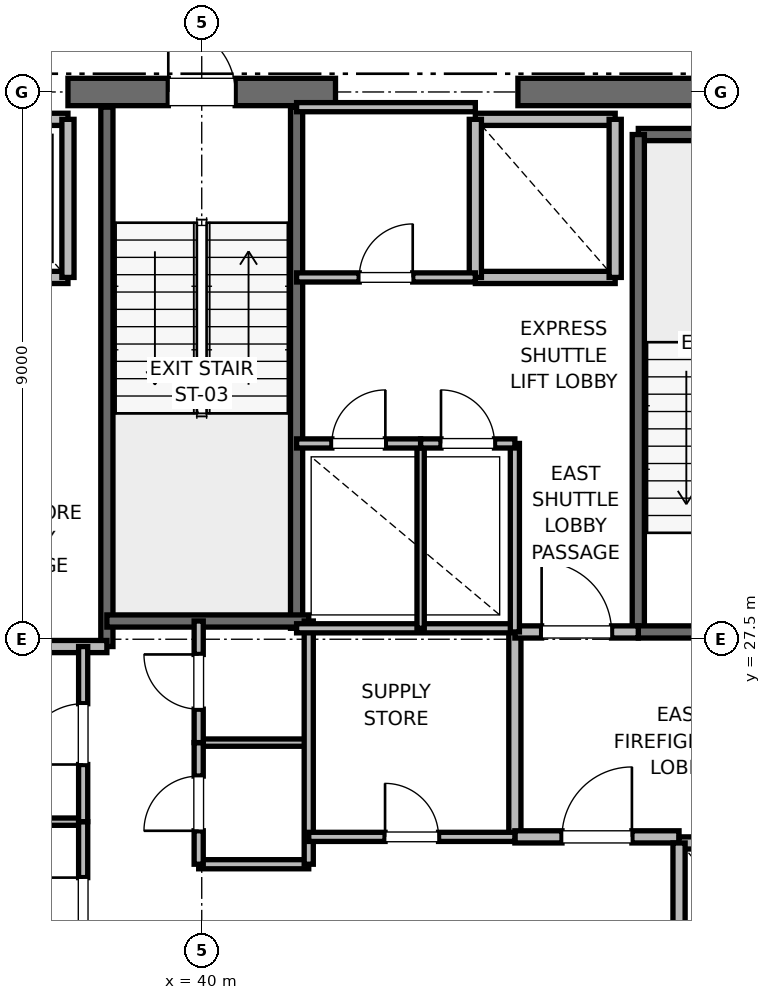
"""IFC4 building model, lengths in metres.
Left out: names, types, materials, properties, quantities, classifications, styles, units other than length and angle.
Written with IfcOpenShell. Run it as: python <this file> out.ifc"""

import sys

from ifc_helpers import new_model, si_unit, direction, frame, frame_2d, origin, place, context, subcontext, project, spatial, rectangle, extrude, element, fill, save


model = new_model("IFC4")
c1 = context("Model", 3, precision=1e-05, world=origin(), true_north=direction((0.0, 1.0)))
c2 = subcontext(c1, "Body", "Model", "MODEL_VIEW")
j1 = project(units=[si_unit("LENGTHUNIT", "METRE"), si_unit("PLANEANGLEUNIT", "RADIAN")], contexts=[c1])
p1 = place(None, origin())
s1 = spatial("IfcSite", under=j1, at=p1, CompositionType="ELEMENT")
p2 = place(p1, origin())
s2 = spatial("IfcBuilding", under=s1, at=p2, CompositionType="ELEMENT")
p3 = place(p2, frame((0.0, 0.0, 259.2)))
s3 = spatial("IfcBuildingStorey", under=s2, at=p3, CompositionType="ELEMENT", Elevation=259.2)
p4 = place(p3, frame((37.8, 36.5, 0.0), z_axis=(0.0, 0.0, 1.0), x_axis=(1.0, 0.0, 0.0)))
e1 = element("IfcWall", 1, at=p4, inside=s3, PredefinedType="SHEAR", context=c2, shape_type="SweptSolid", body=[
    extrude(rectangle(XDim=4.4, YDim=0.45, at=frame_2d((2.2, 0.0))), origin(), (0.0, 0.0, 1.0), 3.785),
])
p5 = place(p4, frame((1.65, 0.0, 0.0)))
e2 = element("IfcOpeningElement", 2, at=p5, cuts=e1, PredefinedType="OPENING", context=c2, shape_type="SweptSolid", body=[
    extrude(rectangle(XDim=1.1, YDim=2.15, at=frame_2d((0.55, 1.075))), frame((0.0, 0.225, 0.0), z_axis=(0.0, -1.0, 0.0), x_axis=(1.0, 0.0, 0.0)), (0.0, 0.0, 1.0), 0.45),
])
p6 = place(p3, frame((45.2, 36.5, 0.0), z_axis=(0.0, 0.0, 1.0), x_axis=(1.0, 0.0, 0.0)))
e3 = element("IfcWall", 3, at=p6, inside=s3, PredefinedType="SHEAR", context=c2, shape_type="SweptSolid", body=[
    extrude(rectangle(XDim=5.8, YDim=0.45, at=frame_2d((2.9, 0.0))), origin(), (0.0, 0.0, 1.0), 3.785),
])
p7 = place(p3, frame((47.18, 35.8, 0.0), z_axis=(0.0, 0.0, 1.0), x_axis=(1.0, 0.0, 0.0)))
e4 = element("IfcWall", 4, at=p7, inside=s3, PredefinedType="SOLIDWALL", context=c2, shape_type="SweptSolid", body=[
    extrude(rectangle(XDim=3.12, YDim=0.2, at=frame_2d((1.56, 0.0))), origin(), (0.0, 0.0, 1.0), 3.785),
])
p8 = place(p3, frame((47.18, 27.62, 0.0), z_axis=(0.0, 0.0, 1.0), x_axis=(0.0, 1.0, 0.0)))
e5 = element("IfcWall", 5, at=p8, inside=s3, PredefinedType="SOLIDWALL", context=c2, shape_type="SweptSolid", body=[
    extrude(rectangle(XDim=8.18, YDim=0.2, at=frame_2d((4.09, 0.0))), origin(), (0.0, 0.0, 1.0), 3.785),
])
p9 = place(p3, frame((47.18, 27.62, 0.0), z_axis=(0.0, 0.0, 1.0), x_axis=(1.0, 0.0, 0.0)))
e6 = element("IfcWall", 6, at=p9, inside=s3, PredefinedType="SOLIDWALL", context=c2, shape_type="SweptSolid", body=[
    extrude(rectangle(XDim=3.12, YDim=0.2, at=frame_2d((1.56, 0.0))), origin(), (0.0, 0.0, 1.0), 3.785),
])
p10 = place(p9, frame((1.01, 0.0, 0.0)))
e7 = element("IfcOpeningElement", 7, at=p10, cuts=e6, PredefinedType="OPENING", context=c2, shape_type="SweptSolid", body=[
    extrude(rectangle(XDim=1.1, YDim=2.15, at=frame_2d((0.55, 1.075))), frame((0.0, 0.1, 0.0), z_axis=(0.0, -1.0, 0.0), x_axis=(1.0, 0.0, 0.0)), (0.0, 0.0, 1.0), 0.2),
])
p11 = place(p3, frame((38.44, 27.38, 0.0), z_axis=(0.0, 0.0, 1.0), x_axis=(0.0, 1.0, 0.0)))
e8 = element("IfcWall", 8, at=p11, inside=s3, PredefinedType="SOLIDWALL", context=c2, shape_type="SweptSolid", body=[
    extrude(rectangle(XDim=8.87, YDim=0.2, at=frame_2d((4.435, 0.0))), origin(), (0.0, 0.0, 1.0), 3.785),
])
p12 = place(p3, frame((41.56, 27.68, 0.0), z_axis=(0.0, 0.0, 1.0), x_axis=(0.0, 1.0, 0.0)))
e9 = element("IfcWall", 9, at=p12, inside=s3, PredefinedType="SOLIDWALL", context=c2, shape_type="SweptSolid", body=[
    extrude(rectangle(XDim=8.57, YDim=0.2, at=frame_2d((4.285, 0.0))), origin(), (0.0, 0.0, 1.0), 3.785),
])
p13 = place(p3, frame((38.44, 27.8, 0.0), z_axis=(0.0, 0.0, 1.0), x_axis=(1.0, 0.0, 0.0)))
e10 = element("IfcWall", 10, at=p13, inside=s3, PredefinedType="SOLIDWALL", context=c2, shape_type="SweptSolid", body=[
    extrude(rectangle(XDim=3.32, YDim=0.2, at=frame_2d((1.66, 0.0))), origin(), (0.0, 0.0, 1.0), 3.785),
])
p14 = place(p3, frame((32.82, 27.38, 0.0), z_axis=(0.0, 0.0, 1.0), x_axis=(1.0, 0.0, 0.0)))
e11 = element("IfcWall", 11, at=p14, inside=s3, PredefinedType="PARTITIONING", context=c2, shape_type="SweptSolid", body=[
    extrude(rectangle(XDim=5.62, YDim=0.2, at=frame_2d((2.81, 0.0))), origin(), (0.0, 0.0, 1.0), 3.785),
])
p15 = place(p3, frame((45.15, 24.25, 0.0), z_axis=(0.0, 0.0, 1.0), x_axis=(0.0, 1.0, 0.0)))
e12 = element("IfcWall", 12, at=p15, inside=s3, PredefinedType="PARTITIONING", context=c2, shape_type="SweptSolid", body=[
    extrude(rectangle(XDim=3.37, YDim=0.2, at=frame_2d((1.685, 0.0))), origin(), (0.0, 0.0, 1.0), 3.785),
])
p16 = place(p3, frame((45.15, 24.25, 0.0), z_axis=(0.0, 0.0, 1.0), x_axis=(1.0, 0.0, 0.0)))
e13 = element("IfcWall", 13, at=p16, inside=s3, PredefinedType="PARTITIONING", context=c2, shape_type="SweptSolid", body=[
    extrude(rectangle(XDim=2.7, YDim=0.2, at=frame_2d((1.35, 0.0))), origin(), (0.0, 0.0, 1.0), 3.785),
])
p17 = place(p16, frame((0.775, 0.0, 0.0)))
e14 = element("IfcOpeningElement", 14, at=p17, cuts=e13, PredefinedType="OPENING", context=c2, shape_type="SweptSolid", body=[
    extrude(rectangle(XDim=1.15, YDim=2.2, at=frame_2d((0.575, 1.1))), frame((0.0, 0.1, 0.0), z_axis=(0.0, -1.0, 0.0), x_axis=(1.0, 0.0, 0.0)), (0.0, 0.0, 1.0), 0.2),
])
p18 = place(p3, frame((45.15, 27.62, 0.0), z_axis=(0.0, 0.0, 1.0), x_axis=(1.0, 0.0, 0.0)))
e15 = element("IfcWall", 15, at=p18, inside=s3, PredefinedType="PARTITIONING", context=c2, shape_type="SweptSolid", body=[
    extrude(rectangle(XDim=2.03, YDim=0.2, at=frame_2d((1.015, 0.0))), origin(), (0.0, 0.0, 1.0), 3.785),
])
p19 = place(p18, frame((0.44, 0.0, 0.0)))
e16 = element("IfcOpeningElement", 16, at=p19, cuts=e15, PredefinedType="OPENING", context=c2, shape_type="SweptSolid", body=[
    extrude(rectangle(XDim=1.15, YDim=2.2, at=frame_2d((0.575, 1.1))), frame((0.0, 0.1, 0.0), z_axis=(0.0, -1.0, 0.0), x_axis=(1.0, 0.0, 0.0)), (0.0, 0.0, 1.0), 0.2),
])
p20 = place(p3, frame((50.45, 24.15, 0.0), z_axis=(0.0, 0.0, 1.0), x_axis=(-1.0, 0.0, 0.0)))
e17 = element("IfcWall", 17, at=p20, inside=s3, PredefinedType="SOLIDWALL", context=c2, shape_type="SweptSolid", body=[
    extrude(rectangle(XDim=2.6, YDim=0.2, at=frame_2d((1.3, 0.0))), origin(), (0.0, 0.0, 1.0), 2.865),
])
p21 = place(p20, frame((0.75, 0.0, 0.0)))
e18 = element("IfcOpeningElement", 18, at=p21, cuts=e17, PredefinedType="OPENING", context=c2, shape_type="SweptSolid", body=[
    extrude(rectangle(XDim=1.1, YDim=2.2, at=frame_2d((0.55, 1.1))), frame((0.0, 0.1, 0.0), z_axis=(0.0, -1.0, 0.0), x_axis=(1.0, 0.0, 0.0)), (0.0, 0.0, 1.0), 0.2),
])
p22 = place(p3, frame((47.85, 24.15, 0.0), z_axis=(0.0, 0.0, 1.0), x_axis=(0.0, -1.0, 0.0)))
e19 = element("IfcWall", 19, at=p22, inside=s3, PredefinedType="SOLIDWALL", context=c2, shape_type="SweptSolid", body=[
    extrude(rectangle(XDim=3.0, YDim=0.2, at=frame_2d((1.5, 0.0))), origin(), (0.0, 0.0, 1.0), 3.785),
])
p23 = place(p3, frame((35.5, 33.45, 0.0), z_axis=(0.0, 0.0, 1.0), x_axis=(1.0, 0.0, 0.0)))
e20 = element("IfcWall", 20, at=p23, inside=s3, PredefinedType="SOLIDWALL", context=c2, shape_type="SweptSolid", body=[
    extrude(rectangle(XDim=2.3, YDim=0.2, at=frame_2d((1.15, 0.0))), origin(), (0.0, 0.0, 1.0), 3.785),
])
p24 = place(p23, frame((0.6, 0.0, 0.0)))
e21 = element("IfcOpeningElement", 21, at=p24, cuts=e20, PredefinedType="OPENING", context=c2, shape_type="SweptSolid", body=[
    extrude(rectangle(XDim=1.1, YDim=2.2, at=frame_2d((0.55, 1.1))), frame((0.0, 0.1, 0.0), z_axis=(0.0, -1.0, 0.0), x_axis=(1.0, 0.0, 0.0)), (0.0, 0.0, 1.0), 0.2),
])
p25 = place(p3, frame((37.8, 36.05, 0.0), z_axis=(0.0, 0.0, 1.0), x_axis=(-1.0, 0.0, 0.0)))
e22 = element("IfcWall", 22, at=p25, inside=s3, PredefinedType="SOLIDWALL", context=c2, shape_type="SweptSolid", body=[
    extrude(rectangle(XDim=2.3, YDim=0.2, at=frame_2d((1.15, 0.0))), origin(), (0.0, 0.0, 1.0), 2.865),
])
p26 = place(p3, frame((37.8, 33.45, 0.0), z_axis=(0.0, 0.0, 1.0), x_axis=(0.0, 1.0, 0.0)))
e23 = element("IfcWall", 23, at=p26, inside=s3, PredefinedType="SOLIDWALL", context=c2, shape_type="SweptSolid", body=[
    extrude(rectangle(XDim=2.6, YDim=0.2, at=frame_2d((1.3, 0.0))), origin(), (0.0, 0.0, 1.0), 2.865),
])
p27 = place(p3, frame((44.5, 33.45, 0.0), z_axis=(0.0, 0.0, 1.0), x_axis=(1.0, 0.0, 0.0)))
e24 = element("IfcWall", 24, at=p27, inside=s3, PredefinedType="SOLIDWALL", context=c2, shape_type="SweptSolid", body=[
    extrude(rectangle(XDim=2.3, YDim=0.2, at=frame_2d((1.15, 0.0))), origin(), (0.0, 0.0, 1.0), 3.785),
])
p28 = place(p3, frame((46.8, 36.05, 0.0), z_axis=(0.0, 0.0, 1.0), x_axis=(-1.0, 0.0, 0.0)))
e25 = element("IfcWall", 25, at=p28, inside=s3, PredefinedType="SOLIDWALL", context=c2, shape_type="SweptSolid", body=[
    extrude(rectangle(XDim=2.3, YDim=0.2, at=frame_2d((1.15, 0.0))), origin(), (0.0, 0.0, 1.0), 2.865),
])
p29 = place(p3, frame((44.5, 36.05, 0.0), z_axis=(0.0, 0.0, 1.0), x_axis=(0.0, -1.0, 0.0)))
e26 = element("IfcWall", 26, at=p29, inside=s3, PredefinedType="SOLIDWALL", context=c2, shape_type="SweptSolid", body=[
    extrude(rectangle(XDim=2.6, YDim=0.2, at=frame_2d((1.3, 0.0))), origin(), (0.0, 0.0, 1.0), 2.865),
])
p30 = place(p3, frame((46.8, 33.45, 0.0), z_axis=(0.0, 0.0, 1.0), x_axis=(0.0, 1.0, 0.0)))
e27 = element("IfcWall", 27, at=p30, inside=s3, PredefinedType="SOLIDWALL", context=c2, shape_type="SweptSolid", body=[
    extrude(rectangle(XDim=2.6, YDim=0.2, at=frame_2d((1.3, 0.0))), origin(), (0.0, 0.0, 1.0), 3.785),
])
p31 = place(p3, frame((39.95, 23.8, 0.0), z_axis=(0.0, 0.0, 1.0), x_axis=(1.0, 0.0, 0.0)))
e28 = element("IfcWall", 28, at=p31, inside=s3, PredefinedType="PARTITIONING", context=c2, shape_type="SweptSolid", body=[
    extrude(rectangle(XDim=1.81, YDim=0.15, at=frame_2d((0.905, 0.0))), origin(), (0.0, 0.0, 1.0), 2.85),
])
p32 = place(p3, frame((39.95, 25.8, 0.0), z_axis=(0.0, 0.0, 1.0), x_axis=(1.0, 0.0, 0.0)))
e29 = element("IfcWall", 29, at=p32, inside=s3, PredefinedType="PARTITIONING", context=c2, shape_type="SweptSolid", body=[
    extrude(rectangle(XDim=1.81, YDim=0.12, at=frame_2d((0.905, 0.0))), origin(), (0.0, 0.0, 1.0), 2.85),
])
p33 = place(p3, frame((41.76, 23.8, 0.0), z_axis=(0.0, 0.0, 1.0), x_axis=(0.0, 1.0, 0.0)))
e30 = element("IfcWall", 30, at=p33, inside=s3, PredefinedType="PARTITIONING", context=c2, shape_type="SweptSolid", body=[
    extrude(rectangle(XDim=4.0, YDim=0.15, at=frame_2d((2.0, 0.0))), origin(), (0.0, 0.0, 1.0), 2.85),
])
p34 = place(p3, frame((39.95, 23.8, 0.0), z_axis=(0.0, 0.0, 1.0), x_axis=(0.0, 1.0, 0.0)))
e31 = element("IfcWall", 31, at=p34, inside=s3, PredefinedType="PARTITIONING", context=c2, shape_type="SweptSolid", body=[
    extrude(rectangle(XDim=2.0, YDim=0.15, at=frame_2d((1.0, 0.0))), origin(), (0.0, 0.0, 1.0), 2.85),
])
p35 = place(p34, frame((0.55, 0.0, 0.0)))
e32 = element("IfcOpeningElement", 32, at=p35, cuts=e31, PredefinedType="OPENING", context=c2, shape_type="SweptSolid", body=[
    extrude(rectangle(XDim=0.9, YDim=2.1, at=frame_2d((0.45, 1.05))), frame((0.0, 0.075, 0.0), z_axis=(0.0, -1.0, 0.0), x_axis=(1.0, 0.0, 0.0)), (0.0, 0.0, 1.0), 0.15),
])
p36 = place(p3, frame((39.95, 25.8, 0.0), z_axis=(0.0, 0.0, 1.0), x_axis=(0.0, 1.0, 0.0)))
e33 = element("IfcWall", 33, at=p36, inside=s3, PredefinedType="PARTITIONING", context=c2, shape_type="SweptSolid", body=[
    extrude(rectangle(XDim=2.0, YDim=0.15, at=frame_2d((1.0, 0.0))), origin(), (0.0, 0.0, 1.0), 2.85),
])
p37 = place(p36, frame((0.55, 0.0, 0.0)))
e34 = element("IfcOpeningElement", 34, at=p37, cuts=e33, PredefinedType="OPENING", context=c2, shape_type="SweptSolid", body=[
    extrude(rectangle(XDim=0.9, YDim=2.1, at=frame_2d((0.45, 1.05))), frame((0.0, 0.075, 0.0), z_axis=(0.0, -1.0, 0.0), x_axis=(1.0, 0.0, 0.0)), (0.0, 0.0, 1.0), 0.15),
])
p38 = place(p3, frame((32.82, 24.5, 0.0), z_axis=(0.0, 0.0, 1.0), x_axis=(1.0, 0.0, 0.0)))
e35 = element("IfcWall", 35, at=p38, inside=s3, PredefinedType="PARTITIONING", context=c2, shape_type="SweptSolid", body=[
    extrude(rectangle(XDim=5.23, YDim=0.12, at=frame_2d((2.615, 0.0))), origin(), (0.0, 0.0, 1.0), 2.85),
])
p39 = place(p3, frame((38.05, 21.66, 0.0), z_axis=(0.0, 0.0, 1.0), x_axis=(0.0, 1.0, 0.0)))
e36 = element("IfcWall", 36, at=p39, inside=s3, PredefinedType="PARTITIONING", context=c2, shape_type="SweptSolid", body=[
    extrude(rectangle(XDim=2.84, YDim=0.15, at=frame_2d((1.42, 0.0))), origin(), (0.0, 0.0, 1.0), 2.85),
])
p40 = place(p39, frame((0.92, 0.0, 0.0)))
e37 = element("IfcOpeningElement", 37, at=p40, cuts=e36, PredefinedType="OPENING", context=c2, shape_type="SweptSolid", body=[
    extrude(rectangle(XDim=1.0, YDim=2.15, at=frame_2d((0.5, 1.075))), frame((0.0, 0.075, 0.0), z_axis=(0.0, -1.0, 0.0), x_axis=(1.0, 0.0, 0.0)), (0.0, 0.0, 1.0), 0.15),
])
p41 = place(p3, frame((38.05, 24.5, 0.0), z_axis=(0.0, 0.0, 1.0), x_axis=(0.0, 1.0, 0.0)))
e38 = element("IfcWall", 38, at=p41, inside=s3, PredefinedType="PARTITIONING", context=c2, shape_type="SweptSolid", body=[
    extrude(rectangle(XDim=2.88, YDim=0.15, at=frame_2d((1.44, 0.0))), origin(), (0.0, 0.0, 1.0), 2.85),
])
p42 = place(p41, frame((0.94, 0.0, 0.0)))
e39 = element("IfcOpeningElement", 39, at=p42, cuts=e38, PredefinedType="OPENING", context=c2, shape_type="SweptSolid", body=[
    extrude(rectangle(XDim=1.0, YDim=2.15, at=frame_2d((0.5, 1.075))), frame((0.0, 0.075, 0.0), z_axis=(0.0, -1.0, 0.0), x_axis=(1.0, 0.0, 0.0)), (0.0, 0.0, 1.0), 0.15),
])
p43 = place(p3, frame((41.56, 27.68, 0.0), z_axis=(0.0, 0.0, 1.0), x_axis=(1.0, 0.0, 0.0)))
e40 = element("IfcWall", 40, at=p43, inside=s3, PredefinedType="PARTITIONING", context=c2, shape_type="SweptSolid", body=[
    extrude(rectangle(XDim=3.59, YDim=0.15, at=frame_2d((1.795, 0.0))), origin(), (0.0, 0.0, 1.0), 2.85),
])
p44 = place(p3, frame((41.76, 24.25, 0.0), z_axis=(0.0, 0.0, 1.0), x_axis=(1.0, 0.0, 0.0)))
e41 = element("IfcWall", 41, at=p44, inside=s3, PredefinedType="PARTITIONING", context=c2, shape_type="SweptSolid", body=[
    extrude(rectangle(XDim=3.39, YDim=0.15, at=frame_2d((1.695, 0.0))), origin(), (0.0, 0.0, 1.0), 2.85),
])
p45 = place(p44, frame((1.255, 0.0, 0.0)))
e42 = element("IfcOpeningElement", 42, at=p45, cuts=e41, PredefinedType="OPENING", context=c2, shape_type="SweptSolid", body=[
    extrude(rectangle(XDim=0.88, YDim=2.1, at=frame_2d((0.44, 1.05))), frame((0.0, 0.075, 0.0), z_axis=(0.0, -1.0, 0.0), x_axis=(1.0, 0.0, 0.0)), (0.0, 0.0, 1.0), 0.15),
])
p46 = place(p3, frame((45.15, 27.62, 0.0), z_axis=(0.0, 0.0, 1.0), x_axis=(0.0, 1.0, 0.0)))
e43 = element("IfcWall", 43, at=p46, inside=s3, PredefinedType="PARTITIONING", context=c2, shape_type="SweptSolid", body=[
    extrude(rectangle(XDim=3.1, YDim=0.15, at=frame_2d((1.55, 0.0))), origin(), (0.0, 0.0, 1.0), 2.85),
])
p47 = place(p3, frame((43.6, 27.68, 0.0), z_axis=(0.0, 0.0, 1.0), x_axis=(0.0, 1.0, 0.0)))
e44 = element("IfcWall", 44, at=p47, inside=s3, PredefinedType="PARTITIONING", context=c2, shape_type="SweptSolid", body=[
    extrude(rectangle(XDim=3.04, YDim=0.12, at=frame_2d((1.52, 0.0))), origin(), (0.0, 0.0, 1.0), 2.85),
])
p48 = place(p3, frame((41.56, 30.72, 0.0), z_axis=(0.0, 0.0, 1.0), x_axis=(1.0, 0.0, 0.0)))
e45 = element("IfcWall", 45, at=p48, inside=s3, PredefinedType="PARTITIONING", context=c2, shape_type="SweptSolid", body=[
    extrude(rectangle(XDim=2.04, YDim=0.15, at=frame_2d((1.02, 0.0))), origin(), (0.0, 0.0, 1.0), 2.85),
])
p49 = place(p48, frame((0.58, 0.0, 0.0)))
e46 = element("IfcOpeningElement", 46, at=p49, cuts=e45, PredefinedType="OPENING", context=c2, shape_type="SweptSolid", body=[
    extrude(rectangle(XDim=0.88, YDim=2.1, at=frame_2d((0.44, 1.05))), frame((0.0, 0.075, 0.0), z_axis=(0.0, -1.0, 0.0), x_axis=(1.0, 0.0, 0.0)), (0.0, 0.0, 1.0), 0.15),
])
p50 = place(p3, frame((43.6, 30.72, 0.0), z_axis=(0.0, 0.0, 1.0), x_axis=(1.0, 0.0, 0.0)))
e47 = element("IfcWall", 47, at=p50, inside=s3, PredefinedType="PARTITIONING", context=c2, shape_type="SweptSolid", body=[
    extrude(rectangle(XDim=1.55, YDim=0.15, at=frame_2d((0.775, 0.0))), origin(), (0.0, 0.0, 1.0), 2.85),
])
p51 = place(p50, frame((0.335, 0.0, 0.0)))
e48 = element("IfcOpeningElement", 48, at=p51, cuts=e47, PredefinedType="OPENING", context=c2, shape_type="SweptSolid", body=[
    extrude(rectangle(XDim=0.88, YDim=2.1, at=frame_2d((0.44, 1.05))), frame((0.0, 0.075, 0.0), z_axis=(0.0, -1.0, 0.0), x_axis=(1.0, 0.0, 0.0)), (0.0, 0.0, 1.0), 0.15),
])
p52 = place(p3, frame((41.56, 36.25, 0.0), z_axis=(0.0, 0.0, 1.0), x_axis=(1.0, 0.0, 0.0)))
e49 = element("IfcWall", 49, at=p52, inside=s3, PredefinedType="PARTITIONING", context=c2, shape_type="SweptSolid", body=[
    extrude(rectangle(XDim=2.94, YDim=0.15, at=frame_2d((1.47, 0.0))), origin(), (0.0, 0.0, 1.0), 2.85),
])
p53 = place(p3, frame((41.56, 33.45, 0.0), z_axis=(0.0, 0.0, 1.0), x_axis=(1.0, 0.0, 0.0)))
e50 = element("IfcWall", 50, at=p53, inside=s3, PredefinedType="PARTITIONING", context=c2, shape_type="SweptSolid", body=[
    extrude(rectangle(XDim=2.94, YDim=0.15, at=frame_2d((1.47, 0.0))), origin(), (0.0, 0.0, 1.0), 2.85),
])
p54 = place(p53, frame((1.03, 0.0, 0.0)))
e51 = element("IfcOpeningElement", 51, at=p54, cuts=e50, PredefinedType="OPENING", context=c2, shape_type="SweptSolid", body=[
    extrude(rectangle(XDim=0.88, YDim=2.1, at=frame_2d((0.44, 1.05))), frame((0.0, 0.075, 0.0), z_axis=(0.0, -1.0, 0.0), x_axis=(1.0, 0.0, 0.0)), (0.0, 0.0, 1.0), 0.15),
])
p55 = place(p5, origin())
e52 = element("IfcDoor", 52, at=p55, inside=s3, OperationType="SINGLE_SWING_LEFT", PredefinedType="DOOR", context=c2, shape_type="SweptSolid", body=[
    extrude(rectangle(XDim=1.1, YDim=2.15, at=frame_2d((0.55, 1.075))), frame((0.0, 0.025, 0.0), z_axis=(0.0, -1.0, 0.0), x_axis=(1.0, 0.0, 0.0)), (0.0, 0.0, 1.0), 0.05),
])
fill(e2, e52)
p56 = place(p17, origin())
e53 = element("IfcDoor", 53, at=p56, inside=s3, OperationType="SINGLE_SWING_RIGHT", PredefinedType="DOOR", context=c2, shape_type="SweptSolid", body=[
    extrude(rectangle(XDim=1.15, YDim=2.2, at=frame_2d((0.575, 1.1))), frame((0.0, 0.025, 0.0), z_axis=(0.0, -1.0, 0.0), x_axis=(1.0, 0.0, 0.0)), (0.0, 0.0, 1.0), 0.05),
])
fill(e14, e53)
p57 = place(p19, origin())
e54 = element("IfcDoor", 54, at=p57, inside=s3, OperationType="SINGLE_SWING_LEFT", PredefinedType="DOOR", context=c2, shape_type="SweptSolid", body=[
    extrude(rectangle(XDim=1.15, YDim=2.2, at=frame_2d((0.575, 1.1))), frame((0.0, 0.025, 0.0), z_axis=(0.0, -1.0, 0.0), x_axis=(1.0, 0.0, 0.0)), (0.0, 0.0, 1.0), 0.05),
])
fill(e16, e54)
p58 = place(p35, origin())
e55 = element("IfcDoor", 55, at=p58, inside=s3, OperationType="SINGLE_SWING_LEFT", PredefinedType="DOOR", context=c2, shape_type="SweptSolid", body=[
    extrude(rectangle(XDim=0.9, YDim=2.1, at=frame_2d((0.45, 1.05))), frame((0.0, 0.025, 0.0), z_axis=(0.0, -1.0, 0.0), x_axis=(1.0, 0.0, 0.0)), (0.0, 0.0, 1.0), 0.05),
])
fill(e32, e55)
p59 = place(p37, origin())
e56 = element("IfcDoor", 56, at=p59, inside=s3, OperationType="SINGLE_SWING_RIGHT", PredefinedType="DOOR", context=c2, shape_type="SweptSolid", body=[
    extrude(rectangle(XDim=0.9, YDim=2.1, at=frame_2d((0.45, 1.05))), frame((0.0, 0.025, 0.0), z_axis=(0.0, -1.0, 0.0), x_axis=(1.0, 0.0, 0.0)), (0.0, 0.0, 1.0), 0.05),
])
fill(e34, e56)
p60 = place(p40, origin())
e57 = element("IfcDoor", 57, at=p60, inside=s3, OperationType="SINGLE_SWING_RIGHT", PredefinedType="DOOR", context=c2, shape_type="SweptSolid", body=[
    extrude(rectangle(XDim=1.0, YDim=2.15, at=frame_2d((0.5, 1.075))), frame((0.0, 0.025, 0.0), z_axis=(0.0, -1.0, 0.0), x_axis=(1.0, 0.0, 0.0)), (0.0, 0.0, 1.0), 0.05),
])
fill(e37, e57)
p61 = place(p42, origin())
e58 = element("IfcDoor", 58, at=p61, inside=s3, OperationType="SINGLE_SWING_LEFT", PredefinedType="DOOR", context=c2, shape_type="SweptSolid", body=[
    extrude(rectangle(XDim=1.0, YDim=2.15, at=frame_2d((0.5, 1.075))), frame((0.0, 0.025, 0.0), z_axis=(0.0, -1.0, 0.0), x_axis=(1.0, 0.0, 0.0)), (0.0, 0.0, 1.0), 0.05),
])
fill(e39, e58)
p62 = place(p45, origin())
e59 = element("IfcDoor", 59, at=p62, inside=s3, OperationType="SINGLE_SWING_LEFT", PredefinedType="DOOR", context=c2, shape_type="SweptSolid", body=[
    extrude(rectangle(XDim=0.88, YDim=2.1, at=frame_2d((0.44, 1.05))), frame((0.0, 0.025, 0.0), z_axis=(0.0, -1.0, 0.0), x_axis=(1.0, 0.0, 0.0)), (0.0, 0.0, 1.0), 0.05),
])
fill(e42, e59)
p63 = place(p49, origin())
e60 = element("IfcDoor", 60, at=p63, inside=s3, OperationType="SINGLE_SWING_RIGHT", PredefinedType="DOOR", context=c2, shape_type="SweptSolid", body=[
    extrude(rectangle(XDim=0.88, YDim=2.1, at=frame_2d((0.44, 1.05))), frame((0.0, 0.025, 0.0), z_axis=(0.0, -1.0, 0.0), x_axis=(1.0, 0.0, 0.0)), (0.0, 0.0, 1.0), 0.05),
])
fill(e46, e60)
p64 = place(p51, origin())
e61 = element("IfcDoor", 61, at=p64, inside=s3, OperationType="SINGLE_SWING_LEFT", PredefinedType="DOOR", context=c2, shape_type="SweptSolid", body=[
    extrude(rectangle(XDim=0.88, YDim=2.1, at=frame_2d((0.44, 1.05))), frame((0.0, 0.025, 0.0), z_axis=(0.0, -1.0, 0.0), x_axis=(1.0, 0.0, 0.0)), (0.0, 0.0, 1.0), 0.05),
])
fill(e48, e61)
p65 = place(p54, origin())
e62 = element("IfcDoor", 62, at=p65, inside=s3, OperationType="SINGLE_SWING_RIGHT", PredefinedType="DOOR", context=c2, shape_type="SweptSolid", body=[
    extrude(rectangle(XDim=0.88, YDim=2.1, at=frame_2d((0.44, 1.05))), frame((0.0, 0.025, 0.0), z_axis=(0.0, -1.0, 0.0), x_axis=(1.0, 0.0, 0.0)), (0.0, 0.0, 1.0), 0.05),
])
fill(e51, e62)
save(model, sys.argv[1])
